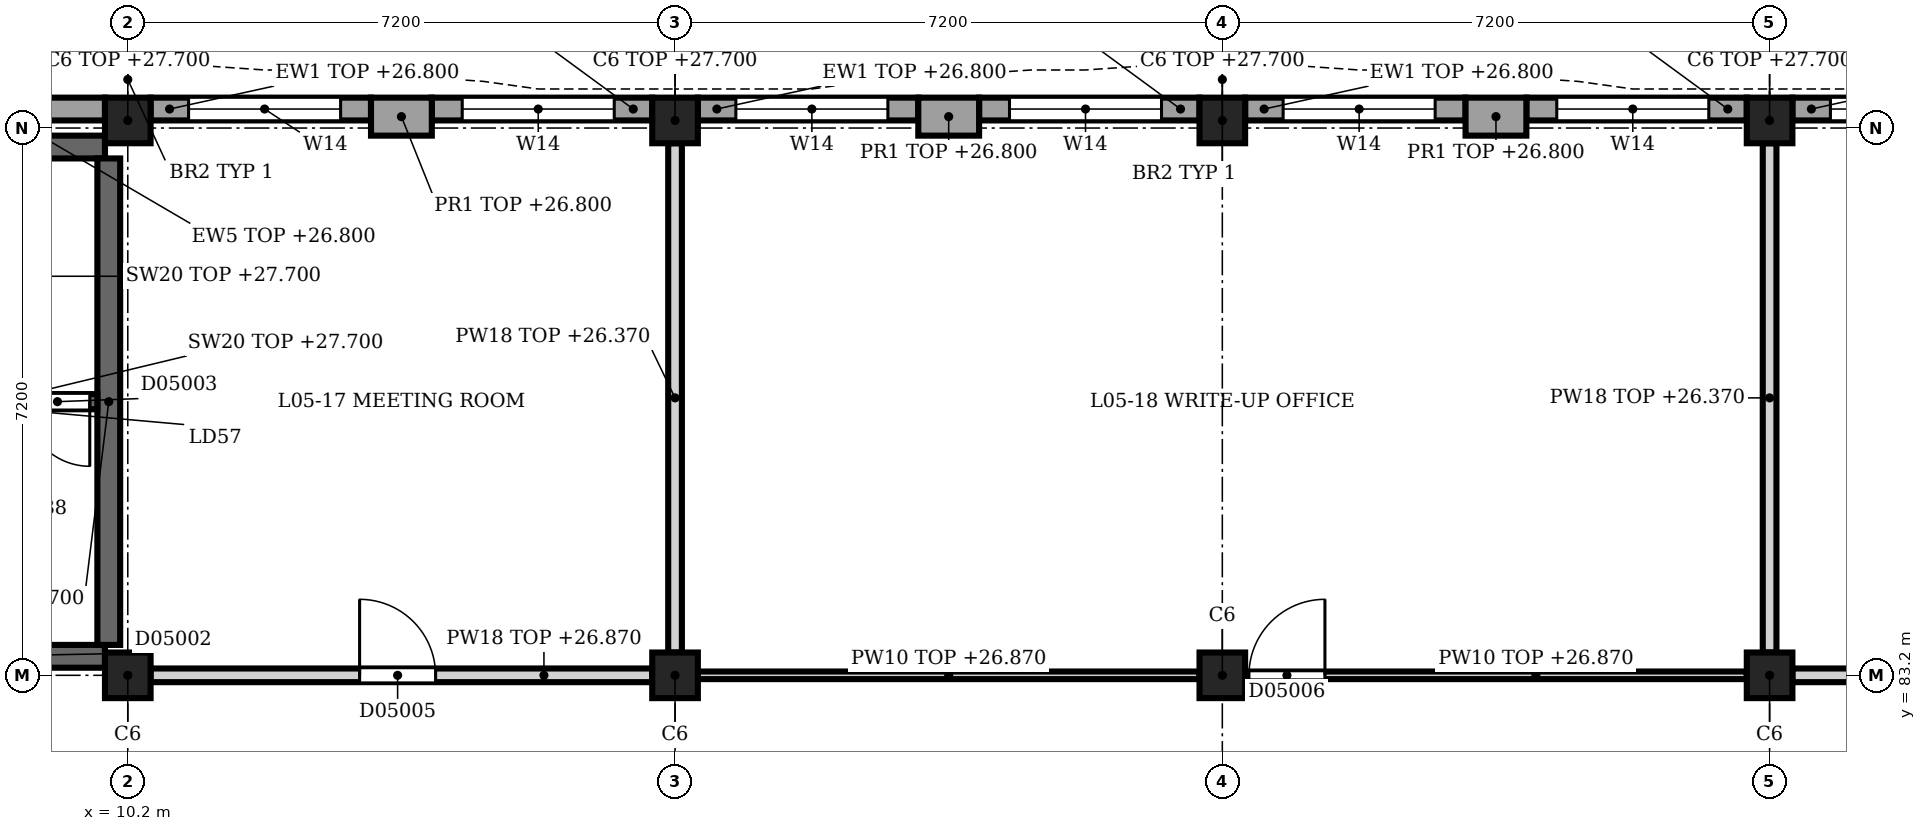
"""IFC4 building model, lengths in metres.
Left out: names, types, materials, properties, quantities, classifications, styles, units other than length and angle.
Written with IfcOpenShell. Run it as: python <this file> out.ifc"""

import sys

from ifc_helpers import new_model, si_unit, direction, frame, frame_2d, origin, origin_2d, place, context, subcontext, project, spatial, rectangle, extrude, element, fill, save


model = new_model("IFC4")
c1 = context("Model", 3, precision=1e-05, world=origin(), true_north=direction((0.0, 1.0)))
c2 = subcontext(c1, "Body", "Model", "MODEL_VIEW")
j1 = project(units=[si_unit("LENGTHUNIT", "METRE"), si_unit("PLANEANGLEUNIT", "RADIAN")], contexts=[c1])
p1 = place(None, origin())
s1 = spatial("IfcSite", under=j1, at=p1, CompositionType="ELEMENT")
p2 = place(p1, origin())
s2 = spatial("IfcBuilding", under=s1, at=p2, CompositionType="ELEMENT")
p3 = place(p2, frame((0.0, 0.0, 23.4)))
s3 = spatial("IfcBuildingStorey", under=s2, at=p3, CompositionType="ELEMENT", Elevation=23.4)
p4 = place(p3, frame((10.2, 83.2, 0.0), z_axis=(0.0, 0.0, 1.0), x_axis=(1.0, 0.0, 0.0)))
e1 = element("IfcColumn", 1, at=p4, inside=s3, PredefinedType="COLUMN", context=c2, shape_type="SweptSolid", body=[
    extrude(rectangle(XDim=0.6, YDim=0.6, at=origin_2d()), origin(), (0.0, 0.0, 1.0), 4.5),
])
p5 = place(p3, frame((10.2, 90.5, 0.0), z_axis=(0.0, 0.0, 1.0), x_axis=(1.0, 0.0, 0.0)))
e2 = element("IfcColumn", 2, at=p5, inside=s3, PredefinedType="COLUMN", context=c2, shape_type="SweptSolid", body=[
    extrude(rectangle(XDim=0.6, YDim=0.6, at=origin_2d()), origin(), (0.0, 0.0, 1.0), 4.3),
])
p6 = place(p3, frame((17.4, 83.2, 0.0), z_axis=(0.0, 0.0, 1.0), x_axis=(1.0, 0.0, 0.0)))
e3 = element("IfcColumn", 3, at=p6, inside=s3, PredefinedType="COLUMN", context=c2, shape_type="SweptSolid", body=[
    extrude(rectangle(XDim=0.6, YDim=0.6, at=origin_2d()), origin(), (0.0, 0.0, 1.0), 4.5),
])
p7 = place(p3, frame((17.4, 90.5, 0.0), z_axis=(0.0, 0.0, 1.0), x_axis=(1.0, 0.0, 0.0)))
e4 = element("IfcColumn", 4, at=p7, inside=s3, PredefinedType="COLUMN", context=c2, shape_type="SweptSolid", body=[
    extrude(rectangle(XDim=0.6, YDim=0.6, at=origin_2d()), origin(), (0.0, 0.0, 1.0), 4.3),
])
p8 = place(p3, frame((24.6, 83.2, 0.0), z_axis=(0.0, 0.0, 1.0), x_axis=(1.0, 0.0, 0.0)))
e5 = element("IfcColumn", 5, at=p8, inside=s3, PredefinedType="COLUMN", context=c2, shape_type="SweptSolid", body=[
    extrude(rectangle(XDim=0.6, YDim=0.6, at=origin_2d()), origin(), (0.0, 0.0, 1.0), 4.5),
])
p9 = place(p3, frame((24.6, 90.5, 0.0), z_axis=(0.0, 0.0, 1.0), x_axis=(1.0, 0.0, 0.0)))
e6 = element("IfcColumn", 6, at=p9, inside=s3, PredefinedType="COLUMN", context=c2, shape_type="SweptSolid", body=[
    extrude(rectangle(XDim=0.6, YDim=0.6, at=origin_2d()), origin(), (0.0, 0.0, 1.0), 4.3),
])
p10 = place(p3, frame((31.8, 83.2, 0.0), z_axis=(0.0, 0.0, 1.0), x_axis=(1.0, 0.0, 0.0)))
e7 = element("IfcColumn", 7, at=p10, inside=s3, PredefinedType="COLUMN", context=c2, shape_type="SweptSolid", body=[
    extrude(rectangle(XDim=0.6, YDim=0.6, at=origin_2d()), origin(), (0.0, 0.0, 1.0), 4.5),
])
p11 = place(p3, frame((31.8, 90.5, 0.0), z_axis=(0.0, 0.0, 1.0), x_axis=(1.0, 0.0, 0.0)))
e8 = element("IfcColumn", 8, at=p11, inside=s3, PredefinedType="COLUMN", context=c2, shape_type="SweptSolid", body=[
    extrude(rectangle(XDim=0.6, YDim=0.6, at=origin_2d()), origin(), (0.0, 0.0, 1.0), 4.3),
])
p12 = place(p3, frame((13.4, 90.55, 0.0), z_axis=(0.0, 0.0, 1.0), x_axis=(1.0, 0.0, 0.0)))
e9 = element("IfcWall", 9, at=p12, inside=s3, PredefinedType="SOLIDWALL", context=c2, shape_type="SweptSolid", body=[
    extrude(rectangle(XDim=0.8, YDim=0.5, at=frame_2d((0.4, 0.0))), origin(), (0.0, 0.0, 1.0), 3.4),
])
p13 = place(p3, frame((20.6, 90.55, 0.0), z_axis=(0.0, 0.0, 1.0), x_axis=(1.0, 0.0, 0.0)))
e10 = element("IfcWall", 10, at=p13, inside=s3, PredefinedType="SOLIDWALL", context=c2, shape_type="SweptSolid", body=[
    extrude(rectangle(XDim=0.8, YDim=0.5, at=frame_2d((0.4, 0.0))), origin(), (0.0, 0.0, 1.0), 3.4),
])
p14 = place(p3, frame((27.8, 90.55, 0.0), z_axis=(0.0, 0.0, 1.0), x_axis=(1.0, 0.0, 0.0)))
e11 = element("IfcWall", 11, at=p14, inside=s3, PredefinedType="SOLIDWALL", context=c2, shape_type="SweptSolid", body=[
    extrude(rectangle(XDim=0.8, YDim=0.5, at=frame_2d((0.4, 0.0))), origin(), (0.0, 0.0, 1.0), 3.4),
])
p15 = place(p3, frame((7.0, 90.65, 0.0), z_axis=(0.0, 0.0, 1.0), x_axis=(1.0, 0.0, 0.0)))
e12 = element("IfcWall", 12, at=p15, inside=s3, PredefinedType="SOLIDWALL", context=c2, shape_type="SweptSolid", body=[
    extrude(rectangle(XDim=2.9, YDim=0.3, at=frame_2d((1.45, 0.0))), origin(), (0.0, 0.0, 1.0), 3.4),
])
p16 = place(p3, frame((10.5, 90.65, 0.0), z_axis=(0.0, 0.0, 1.0), x_axis=(1.0, 0.0, 0.0)))
e13 = element("IfcWall", 13, at=p16, inside=s3, PredefinedType="SOLIDWALL", context=c2, shape_type="SweptSolid", body=[
    extrude(rectangle(XDim=2.9, YDim=0.3, at=frame_2d((1.45, 0.0))), origin(), (0.0, 0.0, 1.0), 3.4),
])
p17 = place(p16, frame((0.5, 0.0, 0.9)))
e14 = element("IfcOpeningElement", 14, at=p17, cuts=e13, PredefinedType="OPENING", context=c2, shape_type="SweptSolid", body=[
    extrude(rectangle(XDim=2.0, YDim=2.4, at=frame_2d((1.0, 1.2))), frame((0.0, 0.16, 0.0), z_axis=(0.0, -1.0, 0.0), x_axis=(1.0, 0.0, 0.0)), (0.0, 0.0, 1.0), 0.32),
])
p18 = place(p3, frame((14.2, 90.65, 0.0), z_axis=(0.0, 0.0, 1.0), x_axis=(1.0, 0.0, 0.0)))
e15 = element("IfcWall", 15, at=p18, inside=s3, PredefinedType="SOLIDWALL", context=c2, shape_type="SweptSolid", body=[
    extrude(rectangle(XDim=2.9, YDim=0.3, at=frame_2d((1.45, 0.0))), origin(), (0.0, 0.0, 1.0), 3.4),
])
p19 = place(p18, frame((0.4, 0.0, 0.9)))
e16 = element("IfcOpeningElement", 16, at=p19, cuts=e15, PredefinedType="OPENING", context=c2, shape_type="SweptSolid", body=[
    extrude(rectangle(XDim=2.0, YDim=2.4, at=frame_2d((1.0, 1.2))), frame((0.0, 0.16, 0.0), z_axis=(0.0, -1.0, 0.0), x_axis=(1.0, 0.0, 0.0)), (0.0, 0.0, 1.0), 0.32),
])
p20 = place(p3, frame((17.7, 90.65, 0.0), z_axis=(0.0, 0.0, 1.0), x_axis=(1.0, 0.0, 0.0)))
e17 = element("IfcWall", 17, at=p20, inside=s3, PredefinedType="SOLIDWALL", context=c2, shape_type="SweptSolid", body=[
    extrude(rectangle(XDim=2.9, YDim=0.3, at=frame_2d((1.45, 0.0))), origin(), (0.0, 0.0, 1.0), 3.4),
])
p21 = place(p20, frame((0.5, 0.0, 0.9)))
e18 = element("IfcOpeningElement", 18, at=p21, cuts=e17, PredefinedType="OPENING", context=c2, shape_type="SweptSolid", body=[
    extrude(rectangle(XDim=2.0, YDim=2.4, at=frame_2d((1.0, 1.2))), frame((0.0, 0.16, 0.0), z_axis=(0.0, -1.0, 0.0), x_axis=(1.0, 0.0, 0.0)), (0.0, 0.0, 1.0), 0.32),
])
p22 = place(p3, frame((21.4, 90.65, 0.0), z_axis=(0.0, 0.0, 1.0), x_axis=(1.0, 0.0, 0.0)))
e19 = element("IfcWall", 19, at=p22, inside=s3, PredefinedType="SOLIDWALL", context=c2, shape_type="SweptSolid", body=[
    extrude(rectangle(XDim=2.9, YDim=0.3, at=frame_2d((1.45, 0.0))), origin(), (0.0, 0.0, 1.0), 3.4),
])
p23 = place(p22, frame((0.4, 0.0, 0.9)))
e20 = element("IfcOpeningElement", 20, at=p23, cuts=e19, PredefinedType="OPENING", context=c2, shape_type="SweptSolid", body=[
    extrude(rectangle(XDim=2.0, YDim=2.4, at=frame_2d((1.0, 1.2))), frame((0.0, 0.16, 0.0), z_axis=(0.0, -1.0, 0.0), x_axis=(1.0, 0.0, 0.0)), (0.0, 0.0, 1.0), 0.32),
])
p24 = place(p3, frame((24.9, 90.65, 0.0), z_axis=(0.0, 0.0, 1.0), x_axis=(1.0, 0.0, 0.0)))
e21 = element("IfcWall", 21, at=p24, inside=s3, PredefinedType="SOLIDWALL", context=c2, shape_type="SweptSolid", body=[
    extrude(rectangle(XDim=2.9, YDim=0.3, at=frame_2d((1.45, 0.0))), origin(), (0.0, 0.0, 1.0), 3.4),
])
p25 = place(p24, frame((0.5, 0.0, 0.9)))
e22 = element("IfcOpeningElement", 22, at=p25, cuts=e21, PredefinedType="OPENING", context=c2, shape_type="SweptSolid", body=[
    extrude(rectangle(XDim=2.0, YDim=2.4, at=frame_2d((1.0, 1.2))), frame((0.0, 0.16, 0.0), z_axis=(0.0, -1.0, 0.0), x_axis=(1.0, 0.0, 0.0)), (0.0, 0.0, 1.0), 0.32),
])
p26 = place(p3, frame((28.6, 90.65, 0.0), z_axis=(0.0, 0.0, 1.0), x_axis=(1.0, 0.0, 0.0)))
e23 = element("IfcWall", 23, at=p26, inside=s3, PredefinedType="SOLIDWALL", context=c2, shape_type="SweptSolid", body=[
    extrude(rectangle(XDim=2.9, YDim=0.3, at=frame_2d((1.45, 0.0))), origin(), (0.0, 0.0, 1.0), 3.4),
])
p27 = place(p26, frame((0.4, 0.0, 0.9)))
e24 = element("IfcOpeningElement", 24, at=p27, cuts=e23, PredefinedType="OPENING", context=c2, shape_type="SweptSolid", body=[
    extrude(rectangle(XDim=2.0, YDim=2.4, at=frame_2d((1.0, 1.2))), frame((0.0, 0.16, 0.0), z_axis=(0.0, -1.0, 0.0), x_axis=(1.0, 0.0, 0.0)), (0.0, 0.0, 1.0), 0.32),
])
p28 = place(p3, frame((32.1, 90.65, 0.0), z_axis=(0.0, 0.0, 1.0), x_axis=(1.0, 0.0, 0.0)))
e25 = element("IfcWall", 25, at=p28, inside=s3, PredefinedType="SOLIDWALL", context=c2, shape_type="SweptSolid", body=[
    extrude(rectangle(XDim=2.9, YDim=0.3, at=frame_2d((1.45, 0.0))), origin(), (0.0, 0.0, 1.0), 3.4),
])
p29 = place(p28, frame((0.5, 0.0, 0.9)))
e26 = element("IfcOpeningElement", 26, at=p29, cuts=e25, PredefinedType="OPENING", context=c2, shape_type="SweptSolid", body=[
    extrude(rectangle(XDim=2.0, YDim=2.4, at=frame_2d((1.0, 1.2))), frame((0.0, 0.16, 0.0), z_axis=(0.0, -1.0, 0.0), x_axis=(1.0, 0.0, 0.0)), (0.0, 0.0, 1.0), 0.32),
])
p30 = place(p3, frame((3.2, 83.45, 0.0), z_axis=(0.0, 0.0, 1.0), x_axis=(1.0, 0.0, 0.0)))
e27 = element("IfcWall", 27, at=p30, inside=s3, PredefinedType="SHEAR", context=c2, shape_type="SweptSolid", body=[
    extrude(rectangle(XDim=6.7, YDim=0.3, at=frame_2d((3.35, 0.0))), origin(), (0.0, 0.0, 1.0), 4.3),
])
p31 = place(p30, frame((4.4, 0.0, 0.0)))
e28 = element("IfcOpeningElement", 28, at=p31, cuts=e27, PredefinedType="OPENING", context=c2, shape_type="SweptSolid", body=[
    extrude(rectangle(XDim=1.2, YDim=2.1, at=frame_2d((0.6, 1.05))), frame((0.0, 0.16, 0.0), z_axis=(0.0, -1.0, 0.0), x_axis=(1.0, 0.0, 0.0)), (0.0, 0.0, 1.0), 0.32),
])
p32 = place(p3, frame((3.2, 90.15, 0.0), z_axis=(0.0, 0.0, 1.0), x_axis=(1.0, 0.0, 0.0)))
e29 = element("IfcWall", 29, at=p32, inside=s3, PredefinedType="SHEAR", context=c2, shape_type="SweptSolid", body=[
    extrude(rectangle(XDim=6.7, YDim=0.3, at=frame_2d((3.35, 0.0))), origin(), (0.0, 0.0, 1.0), 4.3),
])
p33 = place(p32, frame((1.3, 0.0, 1.2)))
e30 = element("IfcOpeningElement", 30, at=p33, cuts=e29, PredefinedType="OPENING", context=c2, shape_type="SweptSolid", body=[
    extrude(rectangle(XDim=0.6, YDim=1.8, at=frame_2d((0.3, 0.9))), frame((0.0, 0.16, 0.0), z_axis=(0.0, -1.0, 0.0), x_axis=(1.0, 0.0, 0.0)), (0.0, 0.0, 1.0), 0.32),
])
p34 = place(p3, frame((9.95, 83.6, 0.0), z_axis=(0.0, 0.0, 1.0), x_axis=(0.0, 1.0, 0.0)))
e31 = element("IfcWall", 31, at=p34, inside=s3, PredefinedType="SHEAR", context=c2, shape_type="SweptSolid", body=[
    extrude(rectangle(XDim=6.4, YDim=0.3, at=frame_2d((3.2, 0.0))), origin(), (0.0, 0.0, 1.0), 4.3),
])
p35 = place(p3, frame((9.8, 86.8, 0.0), z_axis=(0.0, 0.0, 1.0), x_axis=(-1.0, 0.0, 0.0)))
e32 = element("IfcWall", 32, at=p35, inside=s3, PredefinedType="SHEAR", context=c2, shape_type="SweptSolid", body=[
    extrude(rectangle(XDim=3.25, YDim=0.2, at=frame_2d((1.625, 0.0))), origin(), (0.0, 0.0, 1.0), 4.3),
])
p36 = place(p35, frame((1.7, 0.0, 0.0)))
e33 = element("IfcOpeningElement", 33, at=p36, cuts=e32, PredefinedType="OPENING", context=c2, shape_type="SweptSolid", body=[
    extrude(rectangle(XDim=1.1, YDim=2.1, at=frame_2d((0.55, 1.05))), frame((0.0, 0.11, 0.0), z_axis=(0.0, -1.0, 0.0), x_axis=(1.0, 0.0, 0.0)), (0.0, 0.0, 1.0), 0.22),
])
p37 = place(p35, frame((0.1, 0.0, 0.0)))
e34 = element("IfcOpeningElement", 34, at=p37, cuts=e32, PredefinedType="OPENING", context=c2, shape_type="SweptSolid", body=[
    extrude(rectangle(XDim=0.85, YDim=2.1, at=frame_2d((0.425, 1.05))), frame((0.0, 0.11, 0.0), z_axis=(0.0, -1.0, 0.0), x_axis=(1.0, 0.0, 0.0)), (0.0, 0.0, 1.0), 0.22),
])
p38 = place(p3, frame((10.5, 83.2, 0.0), z_axis=(0.0, 0.0, 1.0), x_axis=(1.0, 0.0, 0.0)))
e35 = element("IfcWall", 35, at=p38, inside=s3, PredefinedType="PARTITIONING", context=c2, shape_type="SweptSolid", body=[
    extrude(rectangle(XDim=6.6, YDim=0.18, at=frame_2d((3.3, 0.0))), origin(), (0.0, 0.0, 1.0), 3.47),
])
p39 = place(p38, frame((2.75, 0.0, 0.0)))
e36 = element("IfcOpeningElement", 36, at=p39, cuts=e35, PredefinedType="OPENING", context=c2, shape_type="SweptSolid", body=[
    extrude(rectangle(XDim=1.0, YDim=2.1, at=frame_2d((0.5, 1.05))), frame((0.0, 0.1, 0.0), z_axis=(0.0, -1.0, 0.0), x_axis=(1.0, 0.0, 0.0)), (0.0, 0.0, 1.0), 0.2),
])
p40 = place(p3, frame((17.7, 83.2, 0.0), z_axis=(0.0, 0.0, 1.0), x_axis=(1.0, 0.0, 0.0)))
e37 = element("IfcWall", 37, at=p40, inside=s3, PredefinedType="PARTITIONING", context=c2, shape_type="SweptSolid", body=[
    extrude(rectangle(XDim=6.6, YDim=0.1, at=frame_2d((3.3, 0.0))), origin(), (0.0, 0.0, 1.0), 3.47),
])
p41 = place(p3, frame((24.9, 83.2, 0.0), z_axis=(0.0, 0.0, 1.0), x_axis=(1.0, 0.0, 0.0)))
e38 = element("IfcWall", 38, at=p41, inside=s3, PredefinedType="PARTITIONING", context=c2, shape_type="SweptSolid", body=[
    extrude(rectangle(XDim=6.6, YDim=0.1, at=frame_2d((3.3, 0.0))), origin(), (0.0, 0.0, 1.0), 3.47),
])
p42 = place(p41, frame((0.05, 0.0, 0.0)))
e39 = element("IfcOpeningElement", 39, at=p42, cuts=e38, PredefinedType="OPENING", context=c2, shape_type="SweptSolid", body=[
    extrude(rectangle(XDim=1.0, YDim=2.1, at=frame_2d((0.5, 1.05))), frame((0.0, 0.06, 0.0), z_axis=(0.0, -1.0, 0.0), x_axis=(1.0, 0.0, 0.0)), (0.0, 0.0, 1.0), 0.12),
])
p43 = place(p3, frame((32.1, 83.2, 0.0), z_axis=(0.0, 0.0, 1.0), x_axis=(1.0, 0.0, 0.0)))
e40 = element("IfcWall", 40, at=p43, inside=s3, PredefinedType="PARTITIONING", context=c2, shape_type="SweptSolid", body=[
    extrude(rectangle(XDim=6.6, YDim=0.18, at=frame_2d((3.3, 0.0))), origin(), (0.0, 0.0, 1.0), 3.47),
])
for number, where, z_axis, x_axis in (
    (41, (17.4, 83.5, 0.0), (0.0, 0.0, 1.0), (0.0, 1.0, 0.0)),
    (42, (31.8, 83.5, 0.0), (0.0, 0.0, 1.0), (0.0, 1.0, 0.0)),
):
    element("IfcWall", number, at=place(p3, frame(where, z_axis=z_axis, x_axis=x_axis)), inside=s3, PredefinedType="PARTITIONING", context=c2, shape_type="SweptSolid", body=[
        extrude(rectangle(XDim=6.7, YDim=0.18, at=frame_2d((3.35, 0.0))), origin(), (0.0, 0.0, 1.0), 2.97),
    ])
p44 = place(p17, origin())
e43 = element("IfcWindow", 43, at=p44, inside=s3, PartitioningType="SINGLE_PANEL", PredefinedType="WINDOW", context=c2, shape_type="SweptSolid", body=[
    extrude(rectangle(XDim=2.0, YDim=2.4, at=frame_2d((1.0, 1.2))), frame((0.0, 0.03, 0.0), z_axis=(0.0, -1.0, 0.0), x_axis=(1.0, 0.0, 0.0)), (0.0, 0.0, 1.0), 0.06),
])
fill(e14, e43)
p45 = place(p19, origin())
e44 = element("IfcWindow", 44, at=p45, inside=s3, PartitioningType="SINGLE_PANEL", PredefinedType="WINDOW", context=c2, shape_type="SweptSolid", body=[
    extrude(rectangle(XDim=2.0, YDim=2.4, at=frame_2d((1.0, 1.2))), frame((0.0, 0.03, 0.0), z_axis=(0.0, -1.0, 0.0), x_axis=(1.0, 0.0, 0.0)), (0.0, 0.0, 1.0), 0.06),
])
fill(e16, e44)
p46 = place(p21, origin())
e45 = element("IfcWindow", 45, at=p46, inside=s3, PartitioningType="SINGLE_PANEL", PredefinedType="WINDOW", context=c2, shape_type="SweptSolid", body=[
    extrude(rectangle(XDim=2.0, YDim=2.4, at=frame_2d((1.0, 1.2))), frame((0.0, 0.03, 0.0), z_axis=(0.0, -1.0, 0.0), x_axis=(1.0, 0.0, 0.0)), (0.0, 0.0, 1.0), 0.06),
])
fill(e18, e45)
p47 = place(p23, origin())
e46 = element("IfcWindow", 46, at=p47, inside=s3, PartitioningType="SINGLE_PANEL", PredefinedType="WINDOW", context=c2, shape_type="SweptSolid", body=[
    extrude(rectangle(XDim=2.0, YDim=2.4, at=frame_2d((1.0, 1.2))), frame((0.0, 0.03, 0.0), z_axis=(0.0, -1.0, 0.0), x_axis=(1.0, 0.0, 0.0)), (0.0, 0.0, 1.0), 0.06),
])
fill(e20, e46)
p48 = place(p25, origin())
e47 = element("IfcWindow", 47, at=p48, inside=s3, PartitioningType="SINGLE_PANEL", PredefinedType="WINDOW", context=c2, shape_type="SweptSolid", body=[
    extrude(rectangle(XDim=2.0, YDim=2.4, at=frame_2d((1.0, 1.2))), frame((0.0, 0.03, 0.0), z_axis=(0.0, -1.0, 0.0), x_axis=(1.0, 0.0, 0.0)), (0.0, 0.0, 1.0), 0.06),
])
fill(e22, e47)
p49 = place(p27, origin())
e48 = element("IfcWindow", 48, at=p49, inside=s3, PartitioningType="SINGLE_PANEL", PredefinedType="WINDOW", context=c2, shape_type="SweptSolid", body=[
    extrude(rectangle(XDim=2.0, YDim=2.4, at=frame_2d((1.0, 1.2))), frame((0.0, 0.03, 0.0), z_axis=(0.0, -1.0, 0.0), x_axis=(1.0, 0.0, 0.0)), (0.0, 0.0, 1.0), 0.06),
])
fill(e24, e48)
p50 = place(p29, origin())
e49 = element("IfcWindow", 49, at=p50, inside=s3, PartitioningType="SINGLE_PANEL", PredefinedType="WINDOW", context=c2, shape_type="SweptSolid", body=[
    extrude(rectangle(XDim=2.0, YDim=2.4, at=frame_2d((1.0, 1.2))), frame((0.0, 0.03, 0.0), z_axis=(0.0, -1.0, 0.0), x_axis=(1.0, 0.0, 0.0)), (0.0, 0.0, 1.0), 0.06),
])
fill(e26, e49)
p51 = place(p37, origin())
e50 = element("IfcDoor", 50, at=p51, inside=s3, OperationType="SINGLE_SWING_LEFT", PredefinedType="DOOR", context=c2, shape_type="SweptSolid", body=[
    extrude(rectangle(XDim=0.85, YDim=2.1, at=frame_2d((0.425, 1.05))), frame((0.0, 0.025, 0.0), z_axis=(0.0, -1.0, 0.0), x_axis=(1.0, 0.0, 0.0)), (0.0, 0.0, 1.0), 0.05),
])
fill(e34, e50)
p52 = place(p39, origin())
e51 = element("IfcDoor", 51, at=p52, inside=s3, OperationType="SINGLE_SWING_LEFT", PredefinedType="DOOR", context=c2, shape_type="SweptSolid", body=[
    extrude(rectangle(XDim=1.0, YDim=2.1, at=frame_2d((0.5, 1.05))), frame((0.0, 0.025, 0.0), z_axis=(0.0, -1.0, 0.0), x_axis=(1.0, 0.0, 0.0)), (0.0, 0.0, 1.0), 0.05),
])
fill(e36, e51)
p53 = place(p42, origin())
e52 = element("IfcDoor", 52, at=p53, inside=s3, OperationType="SINGLE_SWING_LEFT", PredefinedType="DOOR", context=c2, shape_type="SweptSolid", body=[
    extrude(rectangle(XDim=1.0, YDim=2.1, at=frame_2d((0.5, 1.05))), frame((0.0, 0.025, 0.0), z_axis=(0.0, -1.0, 0.0), x_axis=(1.0, 0.0, 0.0)), (0.0, 0.0, 1.0), 0.05),
])
fill(e39, e52)
save(model, sys.argv[1])
